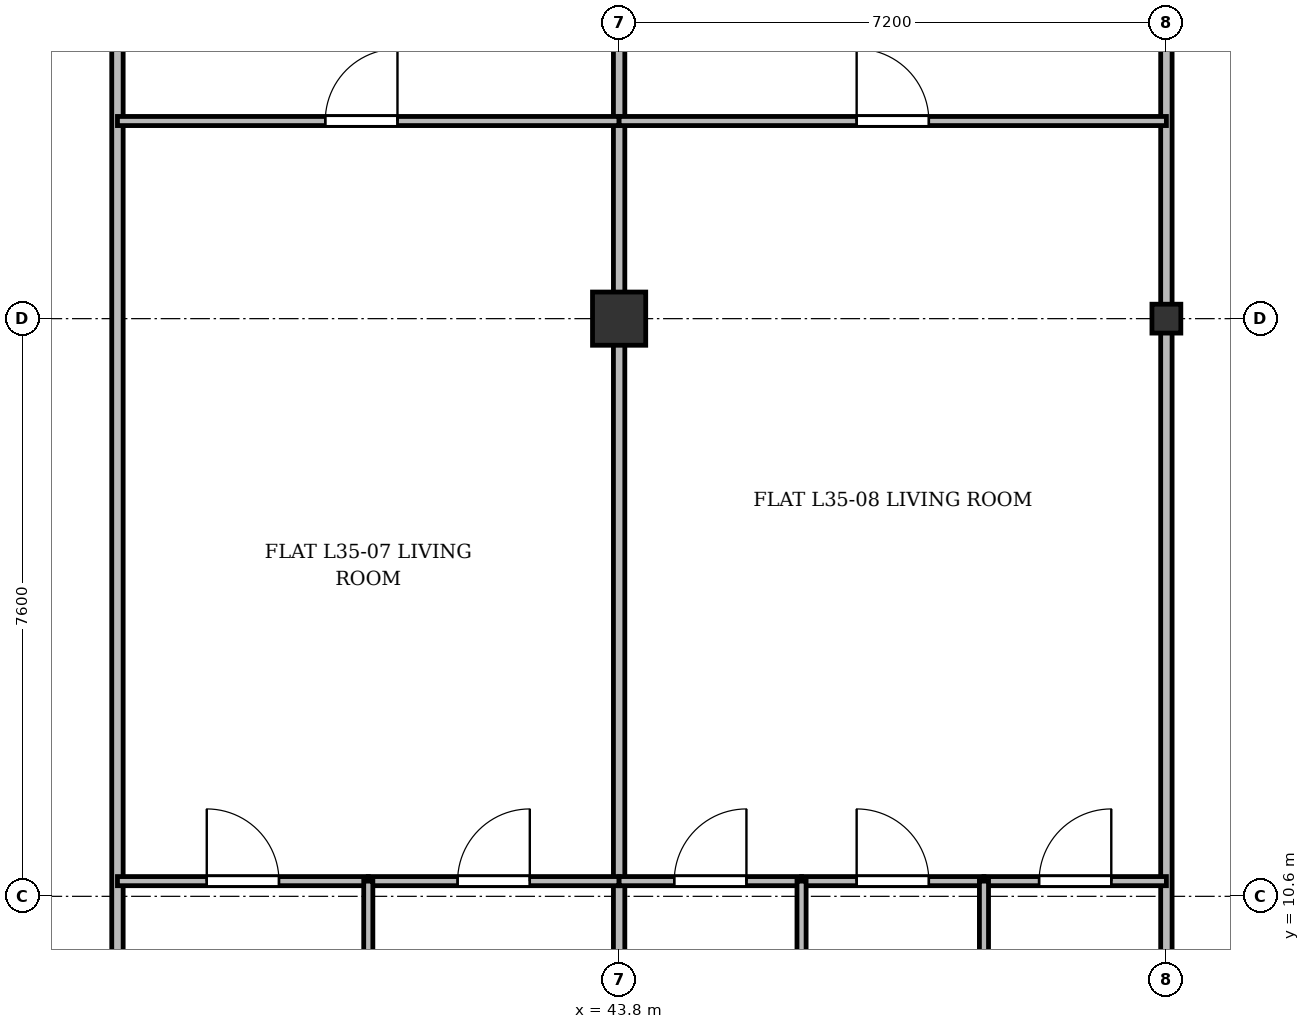
"""IFC4 building model, lengths in metres.
Left out: names, types, materials, properties, quantities, classifications, styles, units other than length and angle.
Written with IfcOpenShell. Run it as: python <this file> out.ifc"""

import sys

from ifc_helpers import new_model, si_unit, direction, frame, frame_2d, origin, origin_2d, place, context, subcontext, project, spatial, rectangle, i_section, extrude, source, transform, mapped, element, fill, save


model = new_model("IFC4")
c1 = context("Model", 3, precision=1e-05, world=origin(), true_north=direction((0.0, 1.0)))
c2 = subcontext(c1, "Body", "Model", "MODEL_VIEW")
j1 = project(units=[si_unit("LENGTHUNIT", "METRE"), si_unit("PLANEANGLEUNIT", "RADIAN")], contexts=[c1])
p1 = place(None, origin())
s1 = spatial("IfcSite", under=j1, at=p1, CompositionType="ELEMENT")
p2 = place(p1, origin())
s2 = spatial("IfcBuilding", under=s1, at=p2, CompositionType="ELEMENT")
p3 = place(p2, frame((0.0, 0.0, 135.7)))
s3 = spatial("IfcBuildingStorey", under=s2, at=p3, CompositionType="ELEMENT", Elevation=135.7)
m1 = source(origin(), c2, "Body", "SweptSolid", [
    extrude(rectangle(XDim=0.7, YDim=0.7, at=origin_2d()), origin(), (0.0, 0.0, 1.0), 3.6),
])
p4 = place(p3, frame((43.8, 18.2, 0.0), z_axis=(0.0, 0.0, 1.0), x_axis=(1.0, 0.0, 0.0)))
e1 = element("IfcColumn", 1, at=p4, inside=s3, PredefinedType="COLUMN", context=c2, shape_type="MappedRepresentation", body=[
    mapped(m1, transform((0.0, 0.0, 0.0), x_axis=(1.0, 0.0, 0.0), y_axis=(0.0, 1.0, 0.0), z_axis=(0.0, 0.0, 1.0), scale=1.0)),
])
m2 = source(origin(), c2, "Body", "SweptSolid", [
    extrude(i_section(OverallWidth=0.38, OverallDepth=0.38, WebThickness=0.02, FlangeThickness=0.03, at=origin_2d()), origin(), (0.0, 0.0, 1.0), 3.6),
])
p5 = place(p3, frame((51.0, 18.2, 0.0), z_axis=(0.0, 0.0, 1.0), x_axis=(1.0, 0.0, 0.0)))
e2 = element("IfcColumn", 2, at=p5, inside=s3, PredefinedType="COLUMN", context=c2, shape_type="MappedRepresentation", body=[
    mapped(m2, transform((0.0, 0.0, 0.0), x_axis=(1.0, 0.0, 0.0), y_axis=(0.0, 1.0, 0.0), z_axis=(0.0, 0.0, 1.0), scale=1.0)),
])
p6 = place(p3, frame((37.2, 3.525, 0.0), z_axis=(0.0, 0.0, 1.0), x_axis=(0.0, 1.0, 0.0)))
e3 = element("IfcWall", 3, at=p6, inside=s3, PredefinedType="PARTITIONING", context=c2, shape_type="SweptSolid", body=[
    extrude(rectangle(XDim=27.275, YDim=0.15, at=frame_2d((13.638, 0.0))), origin(), (0.0, 0.0, 1.0), 2.75),
])
for number, where, z_axis, x_axis in (
    (4, (43.8, 3.525, 0.0), (0.0, 0.0, 1.0), (0.0, 1.0, 0.0)),
    (5, (51.0, 3.525, 0.0), (0.0, 0.0, 1.0), (0.0, 1.0, 0.0)),
):
    element("IfcWall", number, at=place(p3, frame(where, z_axis=z_axis, x_axis=x_axis)), inside=s3, PredefinedType="PARTITIONING", context=c2, shape_type="SweptSolid", body=[
        extrude(rectangle(XDim=27.275, YDim=0.15, at=frame_2d((13.638, 0.0))), origin(), (0.0, 0.0, 1.0), 2.85),
    ])
p7 = place(p3, frame((37.2, 20.8, 0.0), z_axis=(0.0, 0.0, 1.0), x_axis=(1.0, 0.0, 0.0)))
e6 = element("IfcWall", 6, at=p7, inside=s3, PredefinedType="PARTITIONING", context=c2, shape_type="SweptSolid", body=[
    extrude(rectangle(XDim=6.6, YDim=0.12, at=frame_2d((3.3, 0.0))), origin(), (0.0, 0.0, 1.0), 2.85),
])
p8 = place(p7, frame((2.734, 0.0, 0.0)))
e7 = element("IfcOpeningElement", 7, at=p8, cuts=e6, PredefinedType="OPENING", context=c2, shape_type="SweptSolid", body=[
    extrude(rectangle(XDim=0.95, YDim=2.15, at=frame_2d((0.475, 1.075))), frame((0.0, 0.07, 0.0), z_axis=(0.0, -1.0, 0.0), x_axis=(1.0, 0.0, 0.0)), (0.0, 0.0, 1.0), 0.14),
])
p9 = place(p3, frame((37.2, 10.8, 0.0), z_axis=(0.0, 0.0, 1.0), x_axis=(1.0, 0.0, 0.0)))
e8 = element("IfcWall", 8, at=p9, inside=s3, PredefinedType="PARTITIONING", context=c2, shape_type="SweptSolid", body=[
    extrude(rectangle(XDim=3.3, YDim=0.12, at=frame_2d((1.65, 0.0))), origin(), (0.0, 0.0, 1.0), 3.0),
])
p10 = place(p9, frame((1.175, 0.0, 0.0)))
e9 = element("IfcOpeningElement", 9, at=p10, cuts=e8, PredefinedType="OPENING", context=c2, shape_type="SweptSolid", body=[
    extrude(rectangle(XDim=0.95, YDim=2.15, at=frame_2d((0.475, 1.075))), frame((0.0, 0.07, 0.0), z_axis=(0.0, -1.0, 0.0), x_axis=(1.0, 0.0, 0.0)), (0.0, 0.0, 1.0), 0.14),
])
p11 = place(p3, frame((40.5, 10.8, 0.0), z_axis=(0.0, 0.0, 1.0), x_axis=(1.0, 0.0, 0.0)))
e10 = element("IfcWall", 10, at=p11, inside=s3, PredefinedType="PARTITIONING", context=c2, shape_type="SweptSolid", body=[
    extrude(rectangle(XDim=3.3, YDim=0.12, at=frame_2d((1.65, 0.0))), origin(), (0.0, 0.0, 1.0), 2.85),
])
p12 = place(p11, frame((1.175, 0.0, 0.0)))
e11 = element("IfcOpeningElement", 11, at=p12, cuts=e10, PredefinedType="OPENING", context=c2, shape_type="SweptSolid", body=[
    extrude(rectangle(XDim=0.95, YDim=2.15, at=frame_2d((0.475, 1.075))), frame((0.0, 0.07, 0.0), z_axis=(0.0, -1.0, 0.0), x_axis=(1.0, 0.0, 0.0)), (0.0, 0.0, 1.0), 0.14),
])
p13 = place(p3, frame((40.5, 3.525, 0.0), z_axis=(0.0, 0.0, 1.0), x_axis=(0.0, 1.0, 0.0)))
e12 = element("IfcWall", 12, at=p13, inside=s3, PredefinedType="PARTITIONING", context=c2, shape_type="SweptSolid", body=[
    extrude(rectangle(XDim=7.275, YDim=0.12, at=frame_2d((3.638, 0.0))), origin(), (0.0, 0.0, 1.0), 2.75),
])
p14 = place(p3, frame((43.8, 20.8, 0.0), z_axis=(0.0, 0.0, 1.0), x_axis=(1.0, 0.0, 0.0)))
e13 = element("IfcWall", 13, at=p14, inside=s3, PredefinedType="PARTITIONING", context=c2, shape_type="SweptSolid", body=[
    extrude(rectangle(XDim=7.2, YDim=0.12, at=frame_2d((3.6, 0.0))), origin(), (0.0, 0.0, 1.0), 2.85),
])
p15 = place(p14, frame((3.125, 0.0, 0.0)))
e14 = element("IfcOpeningElement", 14, at=p15, cuts=e13, PredefinedType="OPENING", context=c2, shape_type="SweptSolid", body=[
    extrude(rectangle(XDim=0.95, YDim=2.15, at=frame_2d((0.475, 1.075))), frame((0.0, 0.07, 0.0), z_axis=(0.0, -1.0, 0.0), x_axis=(1.0, 0.0, 0.0)), (0.0, 0.0, 1.0), 0.14),
])
p16 = place(p3, frame((43.8, 10.8, 0.0), z_axis=(0.0, 0.0, 1.0), x_axis=(1.0, 0.0, 0.0)))
e15 = element("IfcWall", 15, at=p16, inside=s3, PredefinedType="PARTITIONING", context=c2, shape_type="SweptSolid", body=[
    extrude(rectangle(XDim=2.4, YDim=0.12, at=frame_2d((1.2, 0.0))), origin(), (0.0, 0.0, 1.0), 2.85),
])
p17 = place(p16, frame((0.725, 0.0, 0.0)))
e16 = element("IfcOpeningElement", 16, at=p17, cuts=e15, PredefinedType="OPENING", context=c2, shape_type="SweptSolid", body=[
    extrude(rectangle(XDim=0.95, YDim=2.15, at=frame_2d((0.475, 1.075))), frame((0.0, 0.07, 0.0), z_axis=(0.0, -1.0, 0.0), x_axis=(1.0, 0.0, 0.0)), (0.0, 0.0, 1.0), 0.14),
])
p18 = place(p3, frame((46.2, 10.8, 0.0), z_axis=(0.0, 0.0, 1.0), x_axis=(1.0, 0.0, 0.0)))
e17 = element("IfcWall", 17, at=p18, inside=s3, PredefinedType="PARTITIONING", context=c2, shape_type="SweptSolid", body=[
    extrude(rectangle(XDim=2.4, YDim=0.12, at=frame_2d((1.2, 0.0))), origin(), (0.0, 0.0, 1.0), 3.0),
])
p19 = place(p18, frame((0.725, 0.0, 0.0)))
e18 = element("IfcOpeningElement", 18, at=p19, cuts=e17, PredefinedType="OPENING", context=c2, shape_type="SweptSolid", body=[
    extrude(rectangle(XDim=0.95, YDim=2.15, at=frame_2d((0.475, 1.075))), frame((0.0, 0.07, 0.0), z_axis=(0.0, -1.0, 0.0), x_axis=(1.0, 0.0, 0.0)), (0.0, 0.0, 1.0), 0.14),
])
p20 = place(p3, frame((46.2, 3.525, 0.0), z_axis=(0.0, 0.0, 1.0), x_axis=(0.0, 1.0, 0.0)))
e19 = element("IfcWall", 19, at=p20, inside=s3, PredefinedType="PARTITIONING", context=c2, shape_type="SweptSolid", body=[
    extrude(rectangle(XDim=7.275, YDim=0.12, at=frame_2d((3.638, 0.0))), origin(), (0.0, 0.0, 1.0), 2.75),
])
p21 = place(p3, frame((48.6, 10.8, 0.0), z_axis=(0.0, 0.0, 1.0), x_axis=(1.0, 0.0, 0.0)))
e20 = element("IfcWall", 20, at=p21, inside=s3, PredefinedType="PARTITIONING", context=c2, shape_type="SweptSolid", body=[
    extrude(rectangle(XDim=2.4, YDim=0.12, at=frame_2d((1.2, 0.0))), origin(), (0.0, 0.0, 1.0), 2.85),
])
p22 = place(p21, frame((0.725, 0.0, 0.0)))
e21 = element("IfcOpeningElement", 21, at=p22, cuts=e20, PredefinedType="OPENING", context=c2, shape_type="SweptSolid", body=[
    extrude(rectangle(XDim=0.95, YDim=2.15, at=frame_2d((0.475, 1.075))), frame((0.0, 0.07, 0.0), z_axis=(0.0, -1.0, 0.0), x_axis=(1.0, 0.0, 0.0)), (0.0, 0.0, 1.0), 0.14),
])
p23 = place(p3, frame((48.6, 3.525, 0.0), z_axis=(0.0, 0.0, 1.0), x_axis=(0.0, 1.0, 0.0)))
e22 = element("IfcWall", 22, at=p23, inside=s3, PredefinedType="PARTITIONING", context=c2, shape_type="SweptSolid", body=[
    extrude(rectangle(XDim=7.275, YDim=0.12, at=frame_2d((3.638, 0.0))), origin(), (0.0, 0.0, 1.0), 2.75),
])
m3 = source(origin(), c2, "Body", "SweptSolid", [
    extrude(rectangle(XDim=0.95, YDim=2.15, at=frame_2d((0.475, 1.075))), frame((0.0, 0.025, 0.0), z_axis=(0.0, -1.0, 0.0), x_axis=(1.0, 0.0, 0.0)), (0.0, 0.0, 1.0), 0.05),
])
p24 = place(p8, origin())
e23 = element("IfcDoor", 23, at=p24, inside=s3, OperationType="SINGLE_SWING_RIGHT", PredefinedType="DOOR", context=c2, shape_type="MappedRepresentation", body=[
    mapped(m3, transform((0.0, 0.0, 0.0), x_axis=(1.0, 0.0, 0.0), y_axis=(0.0, 1.0, 0.0), z_axis=(0.0, 0.0, 1.0), scale=1.0)),
])
fill(e7, e23)
p25 = place(p10, origin())
e24 = element("IfcDoor", 24, at=p25, inside=s3, OperationType="SINGLE_SWING_LEFT", PredefinedType="DOOR", context=c2, shape_type="MappedRepresentation", body=[
    mapped(m3, transform((0.0, 0.0, 0.0), x_axis=(1.0, 0.0, 0.0), y_axis=(0.0, 1.0, 0.0), z_axis=(0.0, 0.0, 1.0), scale=1.0)),
])
fill(e9, e24)
p26 = place(p12, origin())
e25 = element("IfcDoor", 25, at=p26, inside=s3, OperationType="SINGLE_SWING_RIGHT", PredefinedType="DOOR", context=c2, shape_type="MappedRepresentation", body=[
    mapped(m3, transform((0.0, 0.0, 0.0), x_axis=(1.0, 0.0, 0.0), y_axis=(0.0, 1.0, 0.0), z_axis=(0.0, 0.0, 1.0), scale=1.0)),
])
fill(e11, e25)
p27 = place(p15, origin())
e26 = element("IfcDoor", 26, at=p27, inside=s3, OperationType="SINGLE_SWING_LEFT", PredefinedType="DOOR", context=c2, shape_type="MappedRepresentation", body=[
    mapped(m3, transform((0.0, 0.0, 0.0), x_axis=(1.0, 0.0, 0.0), y_axis=(0.0, 1.0, 0.0), z_axis=(0.0, 0.0, 1.0), scale=1.0)),
])
fill(e14, e26)
p28 = place(p17, origin())
e27 = element("IfcDoor", 27, at=p28, inside=s3, OperationType="SINGLE_SWING_RIGHT", PredefinedType="DOOR", context=c2, shape_type="MappedRepresentation", body=[
    mapped(m3, transform((0.0, 0.0, 0.0), x_axis=(1.0, 0.0, 0.0), y_axis=(0.0, 1.0, 0.0), z_axis=(0.0, 0.0, 1.0), scale=1.0)),
])
fill(e16, e27)
p29 = place(p19, origin())
e28 = element("IfcDoor", 28, at=p29, inside=s3, OperationType="SINGLE_SWING_LEFT", PredefinedType="DOOR", context=c2, shape_type="MappedRepresentation", body=[
    mapped(m3, transform((0.0, 0.0, 0.0), x_axis=(1.0, 0.0, 0.0), y_axis=(0.0, 1.0, 0.0), z_axis=(0.0, 0.0, 1.0), scale=1.0)),
])
fill(e18, e28)
p30 = place(p22, origin())
e29 = element("IfcDoor", 29, at=p30, inside=s3, OperationType="SINGLE_SWING_RIGHT", PredefinedType="DOOR", context=c2, shape_type="MappedRepresentation", body=[
    mapped(m3, transform((0.0, 0.0, 0.0), x_axis=(1.0, 0.0, 0.0), y_axis=(0.0, 1.0, 0.0), z_axis=(0.0, 0.0, 1.0), scale=1.0)),
])
fill(e21, e29)
save(model, sys.argv[1])
